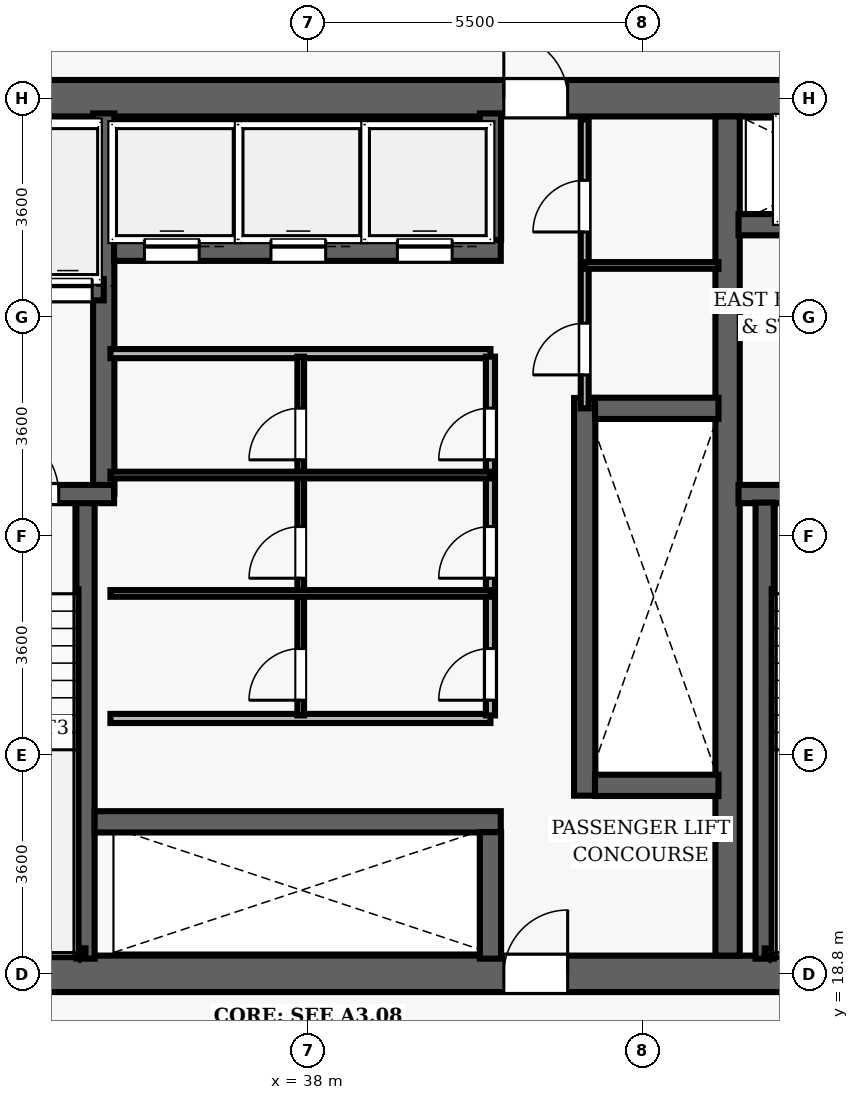
"""IFC4 building model, lengths in metres.
Left out: names, types, materials, properties, quantities, classifications, styles, units other than length and angle.
Written with IfcOpenShell. Run it as: python <this file> out.ifc"""

import sys

from ifc_helpers import new_model, si_unit, direction, frame, frame_2d, origin, place, context, subcontext, project, spatial, rectangle, extrude, element, fill, save


model = new_model("IFC4")
c1 = context("Model", 3, precision=1e-05, world=origin(), true_north=direction((0.0, 1.0)))
c2 = subcontext(c1, "Body", "Model", "MODEL_VIEW")
j1 = project(units=[si_unit("LENGTHUNIT", "METRE"), si_unit("PLANEANGLEUNIT", "RADIAN")], contexts=[c1])
p1 = place(None, origin())
s1 = spatial("IfcSite", under=j1, at=p1, CompositionType="ELEMENT")
p2 = place(p1, origin())
s2 = spatial("IfcBuilding", under=s1, at=p2, CompositionType="ELEMENT")
p3 = place(p2, frame((0.0, 0.0, 44.9)))
s3 = spatial("IfcBuildingStorey", under=s2, at=p3, CompositionType="ELEMENT", Elevation=44.9)
p4 = place(p3, frame((26.7, 18.8, 0.0), z_axis=(0.0, 0.0, 1.0), x_axis=(1.0, 0.0, 0.0)))
e1 = element("IfcWall", 1, at=p4, inside=s3, PredefinedType="SHEAR", context=c2, shape_type="SweptSolid", body=[
    extrude(rectangle(XDim=22.6, YDim=0.6, at=frame_2d((11.3, 0.0))), origin(), (0.0, 0.0, 1.0), 3.5),
])
p5 = place(p4, frame((14.52, 0.0, 0.0)))
e2 = element("IfcOpeningElement", 2, at=p5, cuts=e1, PredefinedType="OPENING", context=c2, shape_type="SweptSolid", body=[
    extrude(rectangle(XDim=1.05, YDim=2.15, at=frame_2d((0.525, 1.075))), frame((0.0, 0.31, 0.0), z_axis=(0.0, -1.0, 0.0), x_axis=(1.0, 0.0, 0.0)), (0.0, 0.0, 1.0), 0.62),
])
p6 = place(p3, frame((26.7, 33.2, 0.0), z_axis=(0.0, 0.0, 1.0), x_axis=(1.0, 0.0, 0.0)))
e3 = element("IfcWall", 3, at=p6, inside=s3, PredefinedType="SHEAR", context=c2, shape_type="SweptSolid", body=[
    extrude(rectangle(XDim=22.6, YDim=0.6, at=frame_2d((11.3, 0.0))), origin(), (0.0, 0.0, 1.0), 3.5),
])
p7 = place(p6, frame((4.62, 0.0, 0.0)))
e4 = element("IfcOpeningElement", 4, at=p7, cuts=e3, PredefinedType="OPENING", context=c2, shape_type="SweptSolid", body=[
    extrude(rectangle(XDim=1.05, YDim=2.15, at=frame_2d((0.525, 1.075))), frame((0.0, 0.31, 0.0), z_axis=(0.0, -1.0, 0.0), x_axis=(1.0, 0.0, 0.0)), (0.0, 0.0, 1.0), 0.62),
])
p8 = place(p6, frame((14.52, 0.0, 0.0)))
e5 = element("IfcOpeningElement", 5, at=p8, cuts=e3, PredefinedType="OPENING", context=c2, shape_type="SweptSolid", body=[
    extrude(rectangle(XDim=1.05, YDim=2.15, at=frame_2d((0.525, 1.075))), frame((0.0, 0.31, 0.0), z_axis=(0.0, -1.0, 0.0), x_axis=(1.0, 0.0, 0.0)), (0.0, 0.0, 1.0), 0.62),
])
p9 = place(p3, frame((44.9, 19.1, 0.0), z_axis=(0.0, 0.0, 1.0), x_axis=(0.0, 1.0, 0.0)))
e6 = element("IfcWall", 6, at=p9, inside=s3, PredefinedType="SHEAR", context=c2, shape_type="SweptSolid", body=[
    extrude(rectangle(XDim=13.8, YDim=0.4, at=frame_2d((6.9, 0.0))), origin(), (0.0, 0.0, 1.0), 3.5),
])
p10 = place(p3, frame((45.08, 26.69, 0.0), z_axis=(0.0, 0.0, 1.0), x_axis=(1.0, 0.0, 0.0)))
e7 = element("IfcWall", 7, at=p10, inside=s3, PredefinedType="SHEAR", context=c2, shape_type="SweptSolid", body=[
    extrude(rectangle(XDim=3.67, YDim=0.3, at=frame_2d((1.835, 0.0))), origin(), (0.0, 0.0, 1.0), 3.5),
])
p11 = place(p10, frame((1.05, 0.0, 0.0)))
e8 = element("IfcOpeningElement", 8, at=p11, cuts=e7, PredefinedType="OPENING", context=c2, shape_type="SweptSolid", body=[
    extrude(rectangle(XDim=1.1, YDim=2.15, at=frame_2d((0.55, 1.075))), frame((0.0, 0.16, 0.0), z_axis=(0.0, -1.0, 0.0), x_axis=(1.0, 0.0, 0.0)), (0.0, 0.0, 1.0), 0.32),
])
p12 = place(p3, frame((45.51, 19.05, 0.0), z_axis=(0.0, 0.0, 1.0), x_axis=(0.0, 1.0, 0.0)))
e9 = element("IfcWall", 9, at=p12, inside=s3, PredefinedType="SHEAR", context=c2, shape_type="SweptSolid", body=[
    extrude(rectangle(XDim=7.5, YDim=0.3, at=frame_2d((3.75, 0.0))), origin(), (0.0, 0.0, 1.0), 3.5),
])
p13 = place(p3, frame((45.51, 19.16, 0.0), z_axis=(0.0, 0.0, 1.0), x_axis=(1.0, 0.0, 0.0)))
e10 = element("IfcWall", 10, at=p13, inside=s3, PredefinedType="SHEAR", context=c2, shape_type="SweptSolid", body=[
    extrude(rectangle(XDim=3.095, YDim=0.12, at=frame_2d((1.547, 0.0))), origin(), (0.0, 0.0, 1.0), 3.5),
])
p14 = place(p3, frame((45.08, 31.12, 0.0), z_axis=(0.0, 0.0, 1.0), x_axis=(1.0, 0.0, 0.0)))
e11 = element("IfcWall", 11, at=p14, inside=s3, PredefinedType="SHEAR", context=c2, shape_type="SweptSolid", body=[
    extrude(rectangle(XDim=3.67, YDim=0.35, at=frame_2d((1.835, 0.0))), origin(), (0.0, 0.0, 1.0), 2.6),
])
p15 = place(p14, frame((1.25, 0.0, 0.0)))
e12 = element("IfcOpeningElement", 12, at=p15, cuts=e11, PredefinedType="OPENING", context=c2, shape_type="SweptSolid", body=[
    extrude(rectangle(XDim=1.1, YDim=2.15, at=frame_2d((0.55, 1.075))), frame((0.0, 0.185, 0.0), z_axis=(0.0, -1.0, 0.0), x_axis=(1.0, 0.0, 0.0)), (0.0, 0.0, 1.0), 0.37),
])
p16 = place(p3, frame((34.34, 19.05, 0.0), z_axis=(0.0, 0.0, 1.0), x_axis=(0.0, 1.0, 0.0)))
e13 = element("IfcWall", 13, at=p16, inside=s3, PredefinedType="SHEAR", context=c2, shape_type="SweptSolid", body=[
    extrude(rectangle(XDim=7.5, YDim=0.3, at=frame_2d((3.75, 0.0))), origin(), (0.0, 0.0, 1.0), 3.5),
])
p17 = place(p3, frame((34.64, 26.69, 0.0), z_axis=(0.0, 0.0, 1.0), x_axis=(0.0, 1.0, 0.0)))
e14 = element("IfcWall", 14, at=p17, inside=s3, PredefinedType="SHEAR", context=c2, shape_type="SweptSolid", body=[
    extrude(rectangle(XDim=6.26, YDim=0.35, at=frame_2d((3.13, 0.0))), origin(), (0.0, 0.0, 1.0), 3.5),
])
p18 = place(p3, frame((31.25, 26.69, 0.0), z_axis=(0.0, 0.0, 1.0), x_axis=(1.0, 0.0, 0.0)))
e15 = element("IfcWall", 15, at=p18, inside=s3, PredefinedType="SHEAR", context=c2, shape_type="SweptSolid", body=[
    extrude(rectangle(XDim=3.56, YDim=0.3, at=frame_2d((1.78, 0.0))), origin(), (0.0, 0.0, 1.0), 3.5),
])
p19 = place(p18, frame((1.55, 0.0, 0.0)))
e16 = element("IfcOpeningElement", 16, at=p19, cuts=e15, PredefinedType="OPENING", context=c2, shape_type="SweptSolid", body=[
    extrude(rectangle(XDim=1.1, YDim=2.15, at=frame_2d((0.55, 1.075))), frame((0.0, 0.16, 0.0), z_axis=(0.0, -1.0, 0.0), x_axis=(1.0, 0.0, 0.0)), (0.0, 0.0, 1.0), 0.32),
])
p20 = place(p3, frame((31.3, 19.16, 0.0), z_axis=(0.0, 0.0, 1.0), x_axis=(1.0, 0.0, 0.0)))
e17 = element("IfcWall", 17, at=p20, inside=s3, PredefinedType="SHEAR", context=c2, shape_type="SweptSolid", body=[
    extrude(rectangle(XDim=3.04, YDim=0.12, at=frame_2d((1.52, 0.0))), origin(), (0.0, 0.0, 1.0), 3.5),
])
p21 = place(p3, frame((32.23, 30.05, 0.0), z_axis=(0.0, 0.0, 1.0), x_axis=(1.0, 0.0, 0.0)))
e18 = element("IfcWall", 18, at=p21, inside=s3, PredefinedType="SHEAR", context=c2, shape_type="SweptSolid", body=[
    extrude(rectangle(XDim=2.41, YDim=0.35, at=frame_2d((1.205, 0.0))), origin(), (0.0, 0.0, 1.0), 2.6),
])
p22 = place(p21, frame((0.42, 0.0, 0.0)))
e19 = element("IfcOpeningElement", 19, at=p22, cuts=e18, PredefinedType="OPENING", context=c2, shape_type="SweptSolid", body=[
    extrude(rectangle(XDim=0.8, YDim=2.15, at=frame_2d((0.4, 1.075))), frame((0.0, 0.185, 0.0), z_axis=(0.0, -1.0, 0.0), x_axis=(1.0, 0.0, 0.0)), (0.0, 0.0, 1.0), 0.37),
])
p23 = place(p21, frame((1.42, 0.0, 0.0)))
e20 = element("IfcOpeningElement", 20, at=p23, cuts=e18, PredefinedType="OPENING", context=c2, shape_type="SweptSolid", body=[
    extrude(rectangle(XDim=0.8, YDim=2.15, at=frame_2d((0.4, 1.075))), frame((0.0, 0.185, 0.0), z_axis=(0.0, -1.0, 0.0), x_axis=(1.0, 0.0, 0.0)), (0.0, 0.0, 1.0), 0.37),
])
p24 = place(p3, frame((42.55, 21.73, 0.0), z_axis=(0.0, 0.0, 1.0), x_axis=(0.0, 1.0, 0.0)))
e21 = element("IfcWall", 21, at=p24, inside=s3, PredefinedType="SHEAR", context=c2, shape_type="SweptSolid", body=[
    extrude(rectangle(XDim=6.54, YDim=0.35, at=frame_2d((3.27, 0.0))), origin(), (0.0, 0.0, 1.0), 2.6),
])
for number, where, z_axis, x_axis in (
    (22, (42.72, 21.9, 0.0), (0.0, 0.0, 1.0), (1.0, 0.0, 0.0)),
    (23, (42.72, 28.1, 0.0), (0.0, 0.0, 1.0), (1.0, 0.0, 0.0)),
):
    element("IfcWall", number, at=place(p3, frame(where, z_axis=z_axis, x_axis=x_axis)), inside=s3, PredefinedType="SHEAR", context=c2, shape_type="SweptSolid", body=[
        extrude(rectangle(XDim=2.03, YDim=0.35, at=frame_2d((1.015, 0.0))), origin(), (0.0, 0.0, 1.0), 2.6),
    ])
p25 = place(p3, frame((34.81, 30.7, 0.0), z_axis=(0.0, 0.0, 1.0), x_axis=(1.0, 0.0, 0.0)))
e24 = element("IfcWall", 24, at=p25, inside=s3, PredefinedType="SHEAR", context=c2, shape_type="SweptSolid", body=[
    extrude(rectangle(XDim=6.36, YDim=0.35, at=frame_2d((3.18, 0.0))), origin(), (0.0, 0.0, 1.0), 2.6),
])
p26 = place(p25, frame((0.5, 0.0, 0.0)))
e25 = element("IfcOpeningElement", 25, at=p26, cuts=e24, PredefinedType="OPENING", context=c2, shape_type="SweptSolid", body=[
    extrude(rectangle(XDim=0.9, YDim=2.15, at=frame_2d((0.45, 1.075))), frame((0.0, 0.185, 0.0), z_axis=(0.0, -1.0, 0.0), x_axis=(1.0, 0.0, 0.0)), (0.0, 0.0, 1.0), 0.37),
])
p27 = place(p25, frame((2.58, 0.0, 0.0)))
e26 = element("IfcOpeningElement", 26, at=p27, cuts=e24, PredefinedType="OPENING", context=c2, shape_type="SweptSolid", body=[
    extrude(rectangle(XDim=0.9, YDim=2.15, at=frame_2d((0.45, 1.075))), frame((0.0, 0.185, 0.0), z_axis=(0.0, -1.0, 0.0), x_axis=(1.0, 0.0, 0.0)), (0.0, 0.0, 1.0), 0.37),
])
p28 = place(p25, frame((4.66, 0.0, 0.0)))
e27 = element("IfcOpeningElement", 27, at=p28, cuts=e24, PredefinedType="OPENING", context=c2, shape_type="SweptSolid", body=[
    extrude(rectangle(XDim=0.9, YDim=2.15, at=frame_2d((0.45, 1.075))), frame((0.0, 0.185, 0.0), z_axis=(0.0, -1.0, 0.0), x_axis=(1.0, 0.0, 0.0)), (0.0, 0.0, 1.0), 0.37),
])
p29 = place(p3, frame((41.0, 30.87, 0.0), z_axis=(0.0, 0.0, 1.0), x_axis=(0.0, 1.0, 0.0)))
e28 = element("IfcWall", 28, at=p29, inside=s3, PredefinedType="SHEAR", context=c2, shape_type="SweptSolid", body=[
    extrude(rectangle(XDim=2.08, YDim=0.35, at=frame_2d((1.04, 0.0))), origin(), (0.0, 0.0, 1.0), 2.6),
])
p30 = place(p3, frame((34.49, 21.3, 0.0), z_axis=(0.0, 0.0, 1.0), x_axis=(1.0, 0.0, 0.0)))
e29 = element("IfcWall", 29, at=p30, inside=s3, PredefinedType="SHEAR", context=c2, shape_type="SweptSolid", body=[
    extrude(rectangle(XDim=6.68, YDim=0.35, at=frame_2d((3.34, 0.0))), origin(), (0.0, 0.0, 1.0), 2.6),
])
p31 = place(p3, frame((41.0, 19.05, 0.0), z_axis=(0.0, 0.0, 1.0), x_axis=(0.0, 1.0, 0.0)))
e30 = element("IfcWall", 30, at=p31, inside=s3, PredefinedType="SHEAR", context=c2, shape_type="SweptSolid", body=[
    extrude(rectangle(XDim=2.08, YDim=0.35, at=frame_2d((1.04, 0.0))), origin(), (0.0, 0.0, 1.0), 2.6),
])
for number, where, z_axis, x_axis in (
    (31, (34.75, 29.0, 0.0), (0.0, 0.0, 1.0), (1.0, 0.0, 0.0)),
    (32, (34.75, 23.0, 0.0), (0.0, 0.0, 1.0), (1.0, 0.0, 0.0)),
):
    element("IfcWall", number, at=place(p3, frame(where, z_axis=z_axis, x_axis=x_axis)), inside=s3, PredefinedType="PARTITIONING", context=c2, shape_type="SweptSolid", body=[
        extrude(rectangle(XDim=6.25, YDim=0.15, at=frame_2d((3.125, 0.0))), origin(), (0.0, 0.0, 1.0), 2.6),
    ])
p32 = place(p3, frame((41.0, 23.05, 0.0), z_axis=(0.0, 0.0, 1.0), x_axis=(0.0, 1.0, 0.0)))
e33 = element("IfcWall", 33, at=p32, inside=s3, PredefinedType="PARTITIONING", context=c2, shape_type="SweptSolid", body=[
    extrude(rectangle(XDim=5.9, YDim=0.15, at=frame_2d((2.95, 0.0))), origin(), (0.0, 0.0, 1.0), 2.6),
])
p33 = place(p32, frame((0.25, 0.0, 0.0)))
e34 = element("IfcOpeningElement", 34, at=p33, cuts=e33, PredefinedType="OPENING", context=c2, shape_type="SweptSolid", body=[
    extrude(rectangle(XDim=0.85, YDim=2.1, at=frame_2d((0.425, 1.05))), frame((0.0, 0.085, 0.0), z_axis=(0.0, -1.0, 0.0), x_axis=(1.0, 0.0, 0.0)), (0.0, 0.0, 1.0), 0.17),
])
p34 = place(p32, frame((2.256, 0.0, 0.0)))
e35 = element("IfcOpeningElement", 35, at=p34, cuts=e33, PredefinedType="OPENING", context=c2, shape_type="SweptSolid", body=[
    extrude(rectangle(XDim=0.85, YDim=2.1, at=frame_2d((0.425, 1.05))), frame((0.0, 0.085, 0.0), z_axis=(0.0, -1.0, 0.0), x_axis=(1.0, 0.0, 0.0)), (0.0, 0.0, 1.0), 0.17),
])
p35 = place(p32, frame((4.203, 0.0, 0.0)))
e36 = element("IfcOpeningElement", 36, at=p35, cuts=e33, PredefinedType="OPENING", context=c2, shape_type="SweptSolid", body=[
    extrude(rectangle(XDim=0.85, YDim=2.1, at=frame_2d((0.425, 1.05))), frame((0.0, 0.085, 0.0), z_axis=(0.0, -1.0, 0.0), x_axis=(1.0, 0.0, 0.0)), (0.0, 0.0, 1.0), 0.17),
])
p36 = place(p3, frame((37.88, 23.05, 0.0), z_axis=(0.0, 0.0, 1.0), x_axis=(0.0, 1.0, 0.0)))
e37 = element("IfcWall", 37, at=p36, inside=s3, PredefinedType="PARTITIONING", context=c2, shape_type="SweptSolid", body=[
    extrude(rectangle(XDim=5.9, YDim=0.11, at=frame_2d((2.95, 0.0))), origin(), (0.0, 0.0, 1.0), 2.6),
])
p37 = place(p36, frame((0.25, 0.0, 0.0)))
e38 = element("IfcOpeningElement", 38, at=p37, cuts=e37, PredefinedType="OPENING", context=c2, shape_type="SweptSolid", body=[
    extrude(rectangle(XDim=0.85, YDim=2.1, at=frame_2d((0.425, 1.05))), frame((0.0, 0.065, 0.0), z_axis=(0.0, -1.0, 0.0), x_axis=(1.0, 0.0, 0.0)), (0.0, 0.0, 1.0), 0.13),
])
p38 = place(p36, frame((2.256, 0.0, 0.0)))
e39 = element("IfcOpeningElement", 39, at=p38, cuts=e37, PredefinedType="OPENING", context=c2, shape_type="SweptSolid", body=[
    extrude(rectangle(XDim=0.85, YDim=2.1, at=frame_2d((0.425, 1.05))), frame((0.0, 0.065, 0.0), z_axis=(0.0, -1.0, 0.0), x_axis=(1.0, 0.0, 0.0)), (0.0, 0.0, 1.0), 0.13),
])
p39 = place(p36, frame((4.203, 0.0, 0.0)))
e40 = element("IfcOpeningElement", 40, at=p39, cuts=e37, PredefinedType="OPENING", context=c2, shape_type="SweptSolid", body=[
    extrude(rectangle(XDim=0.85, YDim=2.1, at=frame_2d((0.425, 1.05))), frame((0.0, 0.065, 0.0), z_axis=(0.0, -1.0, 0.0), x_axis=(1.0, 0.0, 0.0)), (0.0, 0.0, 1.0), 0.13),
])
for number, where, z_axis, x_axis in (
    (41, (34.75, 25.056, 0.0), (0.0, 0.0, 1.0), (1.0, 0.0, 0.0)),
    (42, (34.75, 27.003, 0.0), (0.0, 0.0, 1.0), (1.0, 0.0, 0.0)),
):
    element("IfcWall", number, at=place(p3, frame(where, z_axis=z_axis, x_axis=x_axis)), inside=s3, PredefinedType="PARTITIONING", context=c2, shape_type="SweptSolid", body=[
        extrude(rectangle(XDim=6.25, YDim=0.11, at=frame_2d((3.125, 0.0))), origin(), (0.0, 0.0, 1.0), 2.6),
    ])
p40 = place(p3, frame((42.55, 28.1, 0.0), z_axis=(0.0, 0.0, 1.0), x_axis=(0.0, 1.0, 0.0)))
e43 = element("IfcWall", 43, at=p40, inside=s3, PredefinedType="PARTITIONING", context=c2, shape_type="SweptSolid", body=[
    extrude(rectangle(XDim=4.75, YDim=0.13, at=frame_2d((2.375, 0.0))), origin(), (0.0, 0.0, 1.0), 2.6),
])
p41 = place(p40, frame((0.55, 0.0, 0.0)))
e44 = element("IfcOpeningElement", 44, at=p41, cuts=e43, PredefinedType="OPENING", context=c2, shape_type="SweptSolid", body=[
    extrude(rectangle(XDim=0.85, YDim=2.1, at=frame_2d((0.425, 1.05))), frame((0.0, 0.075, 0.0), z_axis=(0.0, -1.0, 0.0), x_axis=(1.0, 0.0, 0.0)), (0.0, 0.0, 1.0), 0.15),
])
p42 = place(p40, frame((2.9, 0.0, 0.0)))
e45 = element("IfcOpeningElement", 45, at=p42, cuts=e43, PredefinedType="OPENING", context=c2, shape_type="SweptSolid", body=[
    extrude(rectangle(XDim=0.85, YDim=2.1, at=frame_2d((0.425, 1.05))), frame((0.0, 0.075, 0.0), z_axis=(0.0, -1.0, 0.0), x_axis=(1.0, 0.0, 0.0)), (0.0, 0.0, 1.0), 0.15),
])
p43 = place(p3, frame((42.55, 30.45, 0.0), z_axis=(0.0, 0.0, 1.0), x_axis=(1.0, 0.0, 0.0)))
e46 = element("IfcWall", 46, at=p43, inside=s3, PredefinedType="PARTITIONING", context=c2, shape_type="SweptSolid", body=[
    extrude(rectangle(XDim=2.2, YDim=0.11, at=frame_2d((1.1, 0.0))), origin(), (0.0, 0.0, 1.0), 2.6),
])
p44 = place(p19, origin())
e47 = element("IfcDoor", 47, at=p44, inside=s3, OperationType="SINGLE_SWING_LEFT", PredefinedType="DOOR", context=c2, shape_type="SweptSolid", body=[
    extrude(rectangle(XDim=1.1, YDim=2.15, at=frame_2d((0.55, 1.075))), frame((0.0, 0.025, 0.0), z_axis=(0.0, -1.0, 0.0), x_axis=(1.0, 0.0, 0.0)), (0.0, 0.0, 1.0), 0.05),
])
fill(e16, e47)
p45 = place(p8, origin())
e48 = element("IfcDoor", 48, at=p45, inside=s3, OperationType="SINGLE_SWING_LEFT", PredefinedType="DOOR", context=c2, shape_type="SweptSolid", body=[
    extrude(rectangle(XDim=1.05, YDim=2.15, at=frame_2d((0.525, 1.075))), frame((0.0, 0.025, 0.0), z_axis=(0.0, -1.0, 0.0), x_axis=(1.0, 0.0, 0.0)), (0.0, 0.0, 1.0), 0.05),
])
fill(e5, e48)
p46 = place(p5, origin())
e49 = element("IfcDoor", 49, at=p46, inside=s3, OperationType="SINGLE_SWING_RIGHT", PredefinedType="DOOR", context=c2, shape_type="SweptSolid", body=[
    extrude(rectangle(XDim=1.05, YDim=2.15, at=frame_2d((0.525, 1.075))), frame((0.0, 0.025, 0.0), z_axis=(0.0, -1.0, 0.0), x_axis=(1.0, 0.0, 0.0)), (0.0, 0.0, 1.0), 0.05),
])
fill(e2, e49)
p47 = place(p33, origin())
e50 = element("IfcDoor", 50, at=p47, inside=s3, OperationType="SINGLE_SWING_LEFT", PredefinedType="DOOR", context=c2, shape_type="SweptSolid", body=[
    extrude(rectangle(XDim=0.85, YDim=2.1, at=frame_2d((0.425, 1.05))), frame((0.0, 0.025, 0.0), z_axis=(0.0, -1.0, 0.0), x_axis=(1.0, 0.0, 0.0)), (0.0, 0.0, 1.0), 0.05),
])
fill(e34, e50)
p48 = place(p37, origin())
e51 = element("IfcDoor", 51, at=p48, inside=s3, OperationType="SINGLE_SWING_LEFT", PredefinedType="DOOR", context=c2, shape_type="SweptSolid", body=[
    extrude(rectangle(XDim=0.85, YDim=2.1, at=frame_2d((0.425, 1.05))), frame((0.0, 0.025, 0.0), z_axis=(0.0, -1.0, 0.0), x_axis=(1.0, 0.0, 0.0)), (0.0, 0.0, 1.0), 0.05),
])
fill(e38, e51)
p49 = place(p34, origin())
e52 = element("IfcDoor", 52, at=p49, inside=s3, OperationType="SINGLE_SWING_LEFT", PredefinedType="DOOR", context=c2, shape_type="SweptSolid", body=[
    extrude(rectangle(XDim=0.85, YDim=2.1, at=frame_2d((0.425, 1.05))), frame((0.0, 0.025, 0.0), z_axis=(0.0, -1.0, 0.0), x_axis=(1.0, 0.0, 0.0)), (0.0, 0.0, 1.0), 0.05),
])
fill(e35, e52)
p50 = place(p38, origin())
e53 = element("IfcDoor", 53, at=p50, inside=s3, OperationType="SINGLE_SWING_LEFT", PredefinedType="DOOR", context=c2, shape_type="SweptSolid", body=[
    extrude(rectangle(XDim=0.85, YDim=2.1, at=frame_2d((0.425, 1.05))), frame((0.0, 0.025, 0.0), z_axis=(0.0, -1.0, 0.0), x_axis=(1.0, 0.0, 0.0)), (0.0, 0.0, 1.0), 0.05),
])
fill(e39, e53)
p51 = place(p35, origin())
e54 = element("IfcDoor", 54, at=p51, inside=s3, OperationType="SINGLE_SWING_LEFT", PredefinedType="DOOR", context=c2, shape_type="SweptSolid", body=[
    extrude(rectangle(XDim=0.85, YDim=2.1, at=frame_2d((0.425, 1.05))), frame((0.0, 0.025, 0.0), z_axis=(0.0, -1.0, 0.0), x_axis=(1.0, 0.0, 0.0)), (0.0, 0.0, 1.0), 0.05),
])
fill(e36, e54)
p52 = place(p39, origin())
e55 = element("IfcDoor", 55, at=p52, inside=s3, OperationType="SINGLE_SWING_LEFT", PredefinedType="DOOR", context=c2, shape_type="SweptSolid", body=[
    extrude(rectangle(XDim=0.85, YDim=2.1, at=frame_2d((0.425, 1.05))), frame((0.0, 0.025, 0.0), z_axis=(0.0, -1.0, 0.0), x_axis=(1.0, 0.0, 0.0)), (0.0, 0.0, 1.0), 0.05),
])
fill(e40, e55)
p53 = place(p41, origin())
e56 = element("IfcDoor", 56, at=p53, inside=s3, OperationType="SINGLE_SWING_LEFT", PredefinedType="DOOR", context=c2, shape_type="SweptSolid", body=[
    extrude(rectangle(XDim=0.85, YDim=2.1, at=frame_2d((0.425, 1.05))), frame((0.0, 0.025, 0.0), z_axis=(0.0, -1.0, 0.0), x_axis=(1.0, 0.0, 0.0)), (0.0, 0.0, 1.0), 0.05),
])
fill(e44, e56)
p54 = place(p42, origin())
e57 = element("IfcDoor", 57, at=p54, inside=s3, OperationType="SINGLE_SWING_LEFT", PredefinedType="DOOR", context=c2, shape_type="SweptSolid", body=[
    extrude(rectangle(XDim=0.85, YDim=2.1, at=frame_2d((0.425, 1.05))), frame((0.0, 0.025, 0.0), z_axis=(0.0, -1.0, 0.0), x_axis=(1.0, 0.0, 0.0)), (0.0, 0.0, 1.0), 0.05),
])
fill(e45, e57)
p55 = place(p26, origin())
e58 = element("IfcDoor", 58, at=p55, inside=s3, OperationType="SLIDING_TO_LEFT", PredefinedType="DOOR", context=c2, shape_type="SweptSolid", body=[
    extrude(rectangle(XDim=0.9, YDim=2.15, at=frame_2d((0.45, 1.075))), frame((0.0, 0.025, 0.0), z_axis=(0.0, -1.0, 0.0), x_axis=(1.0, 0.0, 0.0)), (0.0, 0.0, 1.0), 0.05),
])
fill(e25, e58)
p56 = place(p27, origin())
e59 = element("IfcDoor", 59, at=p56, inside=s3, OperationType="SLIDING_TO_LEFT", PredefinedType="DOOR", context=c2, shape_type="SweptSolid", body=[
    extrude(rectangle(XDim=0.9, YDim=2.15, at=frame_2d((0.45, 1.075))), frame((0.0, 0.025, 0.0), z_axis=(0.0, -1.0, 0.0), x_axis=(1.0, 0.0, 0.0)), (0.0, 0.0, 1.0), 0.05),
])
fill(e26, e59)
p57 = place(p28, origin())
e60 = element("IfcDoor", 60, at=p57, inside=s3, OperationType="SLIDING_TO_LEFT", PredefinedType="DOOR", context=c2, shape_type="SweptSolid", body=[
    extrude(rectangle(XDim=0.9, YDim=2.15, at=frame_2d((0.45, 1.075))), frame((0.0, 0.025, 0.0), z_axis=(0.0, -1.0, 0.0), x_axis=(1.0, 0.0, 0.0)), (0.0, 0.0, 1.0), 0.05),
])
fill(e27, e60)
p58 = place(p23, origin())
e61 = element("IfcDoor", 61, at=p58, inside=s3, OperationType="SLIDING_TO_LEFT", PredefinedType="DOOR", context=c2, shape_type="SweptSolid", body=[
    extrude(rectangle(XDim=0.8, YDim=2.15, at=frame_2d((0.4, 1.075))), frame((0.0, 0.025, 0.0), z_axis=(0.0, -1.0, 0.0), x_axis=(1.0, 0.0, 0.0)), (0.0, 0.0, 1.0), 0.05),
])
fill(e20, e61)
save(model, sys.argv[1])
